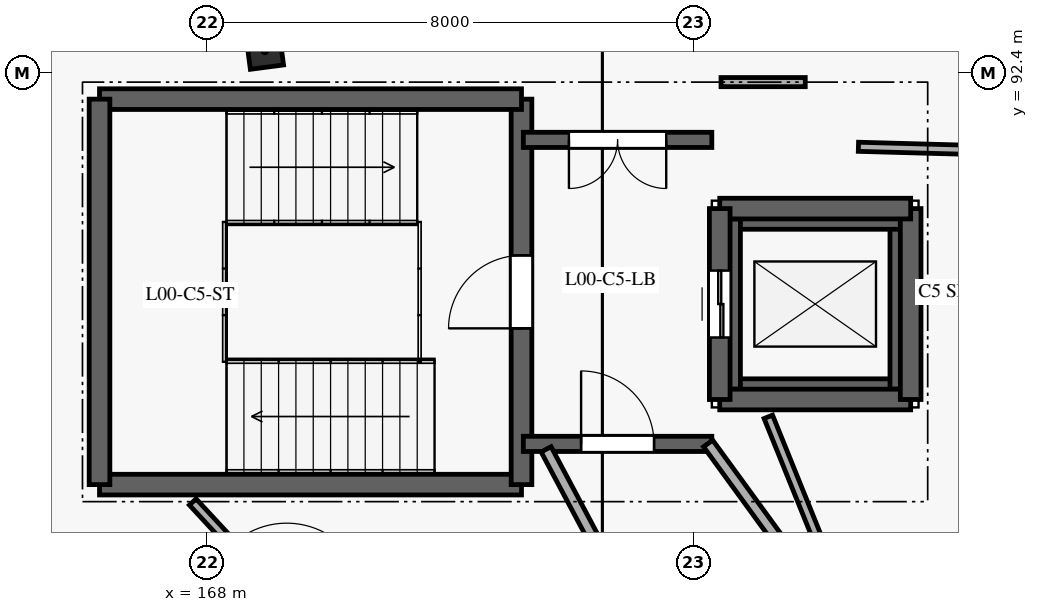
"""IFC4 building model, lengths in metres.
Left out: names, types, materials, properties, quantities, classifications, styles, units other than length and angle.
Written with IfcOpenShell. Run it as: python <this file> out.ifc"""

import sys

from ifc_helpers import new_model, si_unit, direction, frame, frame_2d, origin, origin_2d, place, context, subcontext, project, spatial, rectangle, extrude, element, fill, save


model = new_model("IFC4")
c1 = context("Model", 3, precision=1e-05, world=origin(), true_north=direction((0.0, 1.0)))
c2 = subcontext(c1, "Body", "Model", "MODEL_VIEW")
j1 = project(units=[si_unit("LENGTHUNIT", "METRE"), si_unit("PLANEANGLEUNIT", "RADIAN")], contexts=[c1])
p1 = place(None, origin())
s1 = spatial("IfcSite", under=j1, at=p1, CompositionType="ELEMENT")
p2 = place(p1, origin())
s2 = spatial("IfcBuilding", under=s1, at=p2, CompositionType="ELEMENT")
p3 = place(p2, origin())
s3 = spatial("IfcBuildingStorey", under=s2, at=p3, CompositionType="ELEMENT", Elevation=0.0)
p4 = place(p3, frame((168.948, 92.769, 0.0), z_axis=(0.0, 0.0, 1.0), x_axis=(-0.991444861374, -0.13052619222, 0.0)))
e1 = element("IfcColumn", 1, at=p4, inside=s3, PredefinedType="COLUMN", context=c2, shape_type="SweptSolid", body=[
    extrude(rectangle(XDim=0.55, YDim=0.55, at=origin_2d()), origin(), (0.0, 0.0, 1.0), 4.2),
])
p5 = place(p3, frame((165.723, 81.061, 0.0), z_axis=(0.0, 0.0, 1.0), x_axis=(-0.68021653034, 0.73301123583, 0.0)))
e2 = element("IfcWall", 2, at=p5, inside=s3, PredefinedType="SOLIDWALL", context=c2, shape_type="SweptSolid", body=[
    extrude(rectangle(XDim=6.548, YDim=0.275, at=frame_2d((3.274, 0.0))), origin(), (0.0, 0.0, 1.0), 3.94),
])
p6 = place(p5, frame((3.836, 0.0, 0.85)))
e3 = element("IfcOpeningElement", 3, at=p6, cuts=e2, PredefinedType="OPENING", context=c2, shape_type="SweptSolid", body=[
    extrude(rectangle(XDim=2.15, YDim=1.4, at=frame_2d((1.075, 0.7))), frame((0.0, 0.147, 0.0), z_axis=(0.0, -1.0, 0.0), x_axis=(1.0, 0.0, 0.0)), (0.0, 0.0, 1.0), 0.295),
])
p7 = place(p3, frame((176.6, 87.2, -1.4), z_axis=(0.0, 0.0, 1.0), x_axis=(1.0, 0.0, 0.0)))
e4 = element("IfcWall", 4, at=p7, inside=s3, PredefinedType="SHEAR", context=c2, shape_type="SweptSolid", body=[
    extrude(rectangle(XDim=2.8, YDim=0.34, at=frame_2d((1.4, 0.0))), origin(), (0.0, 0.0, 1.0), 1.4),
])
p8 = place(p3, frame((179.4, 87.2, -1.4), z_axis=(0.0, 0.0, 1.0), x_axis=(0.0, 1.0, 0.0)))
e5 = element("IfcWall", 5, at=p8, inside=s3, PredefinedType="SHEAR", context=c2, shape_type="SweptSolid", body=[
    extrude(rectangle(XDim=2.8, YDim=0.34, at=frame_2d((1.4, 0.0))), origin(), (0.0, 0.0, 1.0), 1.4),
])
p9 = place(p3, frame((179.4, 90.0, -1.4), z_axis=(0.0, 0.0, 1.0), x_axis=(-1.0, 0.0, 0.0)))
e6 = element("IfcWall", 6, at=p9, inside=s3, PredefinedType="SHEAR", context=c2, shape_type="SweptSolid", body=[
    extrude(rectangle(XDim=2.8, YDim=0.34, at=frame_2d((1.4, 0.0))), origin(), (0.0, 0.0, 1.0), 1.4),
])
p10 = place(p3, frame((176.6, 90.0, -1.4), z_axis=(0.0, 0.0, 1.0), x_axis=(0.0, -1.0, 0.0)))
e7 = element("IfcWall", 7, at=p10, inside=s3, PredefinedType="SHEAR", context=c2, shape_type="SweptSolid", body=[
    extrude(rectangle(XDim=2.8, YDim=0.34, at=frame_2d((1.4, 0.0))), origin(), (0.0, 0.0, 1.0), 1.4),
])
p11 = place(p3, frame((166.23, 85.63, 0.0), z_axis=(0.0, 0.0, 1.0), x_axis=(1.0, 0.0, 0.0)))
e8 = element("IfcWall", 8, at=p11, inside=s3, PredefinedType="SHEAR", context=c2, shape_type="SweptSolid", body=[
    extrude(rectangle(XDim=6.94, YDim=0.34, at=frame_2d((3.47, 0.0))), origin(), (0.0, 0.0, 1.0), 3.95),
])
p12 = place(p3, frame((173.17, 85.63, 0.0), z_axis=(0.0, 0.0, 1.0), x_axis=(0.0, 1.0, 0.0)))
e9 = element("IfcWall", 9, at=p12, inside=s3, PredefinedType="SHEAR", context=c2, shape_type="SweptSolid", body=[
    extrude(rectangle(XDim=6.34, YDim=0.34, at=frame_2d((3.17, 0.0))), origin(), (0.0, 0.0, 1.0), 3.95),
])
p13 = place(p12, frame((2.57, 0.0, 0.0)))
e10 = element("IfcOpeningElement", 10, at=p13, cuts=e9, PredefinedType="OPENING", context=c2, shape_type="SweptSolid", body=[
    extrude(rectangle(XDim=1.2, YDim=2.1, at=frame_2d((0.6, 1.05))), frame((0.0, 0.18, 0.0), z_axis=(0.0, -1.0, 0.0), x_axis=(1.0, 0.0, 0.0)), (0.0, 0.0, 1.0), 0.36),
])
p14 = place(p3, frame((173.17, 91.97, 0.0), z_axis=(0.0, 0.0, 1.0), x_axis=(-1.0, 0.0, 0.0)))
e11 = element("IfcWall", 11, at=p14, inside=s3, PredefinedType="SHEAR", context=c2, shape_type="SweptSolid", body=[
    extrude(rectangle(XDim=6.94, YDim=0.34, at=frame_2d((3.47, 0.0))), origin(), (0.0, 0.0, 1.0), 3.95),
])
p15 = place(p3, frame((166.23, 91.97, 0.0), z_axis=(0.0, 0.0, 1.0), x_axis=(0.0, -1.0, 0.0)))
e12 = element("IfcWall", 12, at=p15, inside=s3, PredefinedType="SHEAR", context=c2, shape_type="SweptSolid", body=[
    extrude(rectangle(XDim=6.34, YDim=0.34, at=frame_2d((3.17, 0.0))), origin(), (0.0, 0.0, 1.0), 3.95),
])
p16 = place(p3, frame((176.43, 87.03, 0.0), z_axis=(0.0, 0.0, 1.0), x_axis=(1.0, 0.0, 0.0)))
e13 = element("IfcWall", 13, at=p16, inside=s3, PredefinedType="SHEAR", context=c2, shape_type="SweptSolid", body=[
    extrude(rectangle(XDim=3.14, YDim=0.34, at=frame_2d((1.57, 0.0))), origin(), (0.0, 0.0, 1.0), 3.95),
])
p17 = place(p3, frame((179.57, 87.03, 0.0), z_axis=(0.0, 0.0, 1.0), x_axis=(0.0, 1.0, 0.0)))
e14 = element("IfcWall", 14, at=p17, inside=s3, PredefinedType="SHEAR", context=c2, shape_type="SweptSolid", body=[
    extrude(rectangle(XDim=3.14, YDim=0.34, at=frame_2d((1.57, 0.0))), origin(), (0.0, 0.0, 1.0), 3.95),
])
p18 = place(p3, frame((179.57, 90.17, 0.0), z_axis=(0.0, 0.0, 1.0), x_axis=(-1.0, 0.0, 0.0)))
e15 = element("IfcWall", 15, at=p18, inside=s3, PredefinedType="SHEAR", context=c2, shape_type="SweptSolid", body=[
    extrude(rectangle(XDim=3.14, YDim=0.34, at=frame_2d((1.57, 0.0))), origin(), (0.0, 0.0, 1.0), 3.95),
])
p19 = place(p3, frame((176.43, 90.17, 0.0), z_axis=(0.0, 0.0, 1.0), x_axis=(0.0, -1.0, 0.0)))
e16 = element("IfcWall", 16, at=p19, inside=s3, PredefinedType="SHEAR", context=c2, shape_type="SweptSolid", body=[
    extrude(rectangle(XDim=3.14, YDim=0.34, at=frame_2d((1.57, 0.0))), origin(), (0.0, 0.0, 1.0), 3.95),
])
p20 = place(p19, frame((1.02, 0.0, 0.0)))
e17 = element("IfcOpeningElement", 17, at=p20, cuts=e16, PredefinedType="OPENING", context=c2, shape_type="SweptSolid", body=[
    extrude(rectangle(XDim=1.1, YDim=2.1, at=frame_2d((0.55, 1.05))), frame((0.0, 0.18, 0.0), z_axis=(0.0, -1.0, 0.0), x_axis=(1.0, 0.0, 0.0)), (0.0, 0.0, 1.0), 0.36),
])
p21 = place(p3, frame((173.2, 86.3, 0.0), z_axis=(0.0, 0.0, 1.0), x_axis=(1.0, 0.0, 0.0)))
e18 = element("IfcWall", 18, at=p21, inside=s3, PredefinedType="SHEAR", context=c2, shape_type="SweptSolid", body=[
    extrude(rectangle(XDim=3.1, YDim=0.25, at=frame_2d((1.55, 0.0))), origin(), (0.0, 0.0, 1.0), 3.95),
])
p22 = place(p21, frame((0.95, 0.0, 0.0)))
e19 = element("IfcOpeningElement", 19, at=p22, cuts=e18, PredefinedType="OPENING", context=c2, shape_type="SweptSolid", body=[
    extrude(rectangle(XDim=1.2, YDim=2.1, at=frame_2d((0.6, 1.05))), frame((0.0, 0.135, 0.0), z_axis=(0.0, -1.0, 0.0), x_axis=(1.0, 0.0, 0.0)), (0.0, 0.0, 1.0), 0.27),
])
p23 = place(p3, frame((176.3, 91.3, 0.0), z_axis=(0.0, 0.0, 1.0), x_axis=(-1.0, 0.0, 0.0)))
e20 = element("IfcWall", 20, at=p23, inside=s3, PredefinedType="SHEAR", context=c2, shape_type="SweptSolid", body=[
    extrude(rectangle(XDim=3.1, YDim=0.25, at=frame_2d((1.55, 0.0))), origin(), (0.0, 0.0, 1.0), 3.95),
])
p24 = place(p23, frame((0.75, 0.0, 0.0)))
e21 = element("IfcOpeningElement", 21, at=p24, cuts=e20, PredefinedType="OPENING", context=c2, shape_type="SweptSolid", body=[
    extrude(rectangle(XDim=1.6, YDim=2.15, at=frame_2d((0.8, 1.075))), frame((0.0, 0.135, 0.0), z_axis=(0.0, -1.0, 0.0), x_axis=(1.0, 0.0, 0.0)), (0.0, 0.0, 1.0), 0.27),
])
p25 = place(p3, frame((180.834, 79.997, 0.0), z_axis=(0.0, 0.0, 1.0), x_axis=(-0.588660691672, 0.808380226181, 0.0)))
e22 = element("IfcWall", 22, at=p25, inside=s3, PredefinedType="PARTITIONING", context=c2, shape_type="SweptSolid", body=[
    extrude(rectangle(XDim=7.806, YDim=0.185, at=frame_2d((3.903, 0.0))), origin(), (0.0, 0.0, 1.0), 3.915),
])
p26 = place(p3, frame((173.574, 86.21, 0.0), z_axis=(0.0, 0.0, 1.0), x_axis=(0.469691859779, -0.882830423613, 0.0)))
e23 = element("IfcWall", 23, at=p26, inside=s3, PredefinedType="PARTITIONING", context=c2, shape_type="SweptSolid", body=[
    extrude(rectangle(XDim=8.314, YDim=0.185, at=frame_2d((4.157, 0.0))), origin(), (0.0, 0.0, 1.0), 3.915),
])
p27 = place(p3, frame((177.229, 86.745, 0.0), z_axis=(0.0, 0.0, 1.0), x_axis=(0.37456373842, -0.927201167957, 0.0)))
e24 = element("IfcWall", 24, at=p27, inside=s3, PredefinedType="PARTITIONING", context=c2, shape_type="SweptSolid", body=[
    extrude(rectangle(XDim=3.327, YDim=0.15, at=frame_2d((1.664, 0.0))), origin(), (0.0, 0.0, 1.0), 3.915),
])
p28 = place(p3, frame((188.163, 90.927, 0.0), z_axis=(0.0, 0.0, 1.0), x_axis=(-0.999623287431, 0.027446005645, 0.0)))
e25 = element("IfcWall", 25, at=p28, inside=s3, PredefinedType="PARTITIONING", context=c2, shape_type="SweptSolid", body=[
    extrude(rectangle(XDim=9.456, YDim=0.15, at=frame_2d((4.728, 0.0))), origin(), (0.0, 0.0, 1.0), 3.915),
])
p29 = place(p28, frame((4.068, 0.0, 0.0)))
e26 = element("IfcOpeningElement", 26, at=p29, cuts=e25, PredefinedType="OPENING", context=c2, shape_type="SweptSolid", body=[
    extrude(rectangle(XDim=1.32, YDim=2.12, at=frame_2d((0.66, 1.06))), frame((0.0, 0.085, 0.0), z_axis=(0.0, -1.0, 0.0), x_axis=(1.0, 0.0, 0.0)), (0.0, 0.0, 1.0), 0.17),
])
p30 = place(p3, frame((177.836, 92.25, 0.0), z_axis=(0.0, 0.0, 1.0), x_axis=(-1.0, 0.0, 0.0)))
e27 = element("IfcWall", 27, at=p30, inside=s3, PredefinedType="PARTITIONING", context=c2, shape_type="SweptSolid", body=[
    extrude(rectangle(XDim=1.385, YDim=0.15, at=frame_2d((0.692, 0.0))), origin(), (0.0, 0.0, 1.0), 3.915),
])
p31 = place(p3, frame((167.763, 85.345, 0.0), z_axis=(0.0, 0.0, 1.0), x_axis=(0.679478896711, -0.733695051724, 0.0)))
e28 = element("IfcWall", 28, at=p31, inside=s3, PredefinedType="PARTITIONING", context=c2, shape_type="SweptSolid", body=[
    extrude(rectangle(XDim=3.229, YDim=0.15, at=frame_2d((1.614, 0.0))), origin(), (0.0, 0.0, 1.0), 3.915),
])
p32 = place(p31, frame((0.954, 0.0, 0.0)))
e29 = element("IfcOpeningElement", 29, at=p32, cuts=e28, PredefinedType="OPENING", context=c2, shape_type="SweptSolid", body=[
    extrude(rectangle(XDim=1.32, YDim=2.12, at=frame_2d((0.66, 1.06))), frame((0.0, 0.085, 0.0), z_axis=(0.0, -1.0, 0.0), x_axis=(1.0, 0.0, 0.0)), (0.0, 0.0, 1.0), 0.17),
])
p33 = place(p13, frame((1.2, 0.0, 0.0), z_axis=(0.0, 0.0, 1.0), x_axis=(-1.0, 0.0, 0.0)))
e30 = element("IfcDoor", 30, at=p33, inside=s3, OperationType="SINGLE_SWING_LEFT", PredefinedType="DOOR", context=c2, shape_type="SweptSolid", body=[
    extrude(rectangle(XDim=1.2, YDim=2.1, at=frame_2d((0.6, 1.05))), frame((0.0, 0.025, 0.0), z_axis=(0.0, -1.0, 0.0), x_axis=(1.0, 0.0, 0.0)), (0.0, 0.0, 1.0), 0.05),
])
fill(e10, e30)
p34 = place(p20, frame((1.1, 0.0, 0.0), z_axis=(0.0, 0.0, 1.0), x_axis=(-1.0, 0.0, 0.0)))
e31 = element("IfcDoor", 31, at=p34, inside=s3, OperationType="DOUBLE_DOOR_SLIDING", PredefinedType="DOOR", context=c2, shape_type="SweptSolid", body=[
    extrude(rectangle(XDim=1.1, YDim=2.1, at=frame_2d((0.55, 1.05))), frame((0.0, 0.025, 0.0), z_axis=(0.0, -1.0, 0.0), x_axis=(1.0, 0.0, 0.0)), (0.0, 0.0, 1.0), 0.05),
])
fill(e17, e31)
p35 = place(p22, frame((1.2, 0.0, 0.0), z_axis=(0.0, 0.0, 1.0), x_axis=(-1.0, 0.0, 0.0)))
e32 = element("IfcDoor", 32, at=p35, inside=s3, OperationType="SINGLE_SWING_LEFT", PredefinedType="DOOR", context=c2, shape_type="SweptSolid", body=[
    extrude(rectangle(XDim=1.2, YDim=2.1, at=frame_2d((0.6, 1.05))), frame((0.0, 0.025, 0.0), z_axis=(0.0, -1.0, 0.0), x_axis=(1.0, 0.0, 0.0)), (0.0, 0.0, 1.0), 0.05),
])
fill(e19, e32)
p36 = place(p24, frame((1.6, 0.0, 0.0), z_axis=(0.0, 0.0, 1.0), x_axis=(-1.0, 0.0, 0.0)))
e33 = element("IfcDoor", 33, at=p36, inside=s3, OperationType="DOUBLE_DOOR_SINGLE_SWING", PredefinedType="DOOR", context=c2, shape_type="SweptSolid", body=[
    extrude(rectangle(XDim=1.6, YDim=2.15, at=frame_2d((0.8, 1.075))), frame((0.0, 0.025, 0.0), z_axis=(0.0, -1.0, 0.0), x_axis=(1.0, 0.0, 0.0)), (0.0, 0.0, 1.0), 0.05),
])
fill(e21, e33)
save(model, sys.argv[1])
